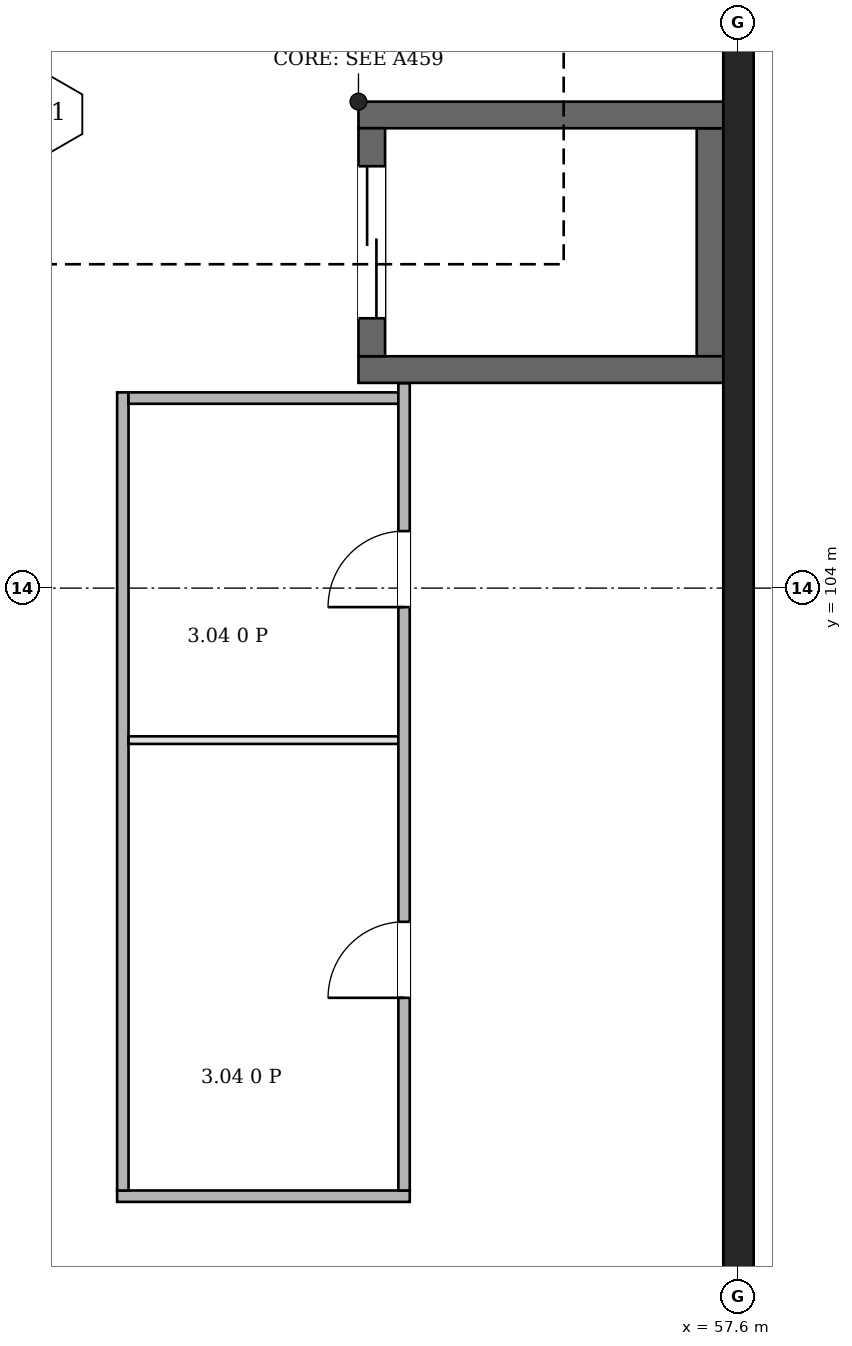
"""IFC4 building model, lengths in metres.
Left out: names, types, materials, properties, quantities, classifications, styles, units other than length and angle.
Written with IfcOpenShell. Run it as: python <this file> out.ifc"""

import sys

from ifc_helpers import new_model, si_unit, direction, frame, frame_2d, origin, place, context, subcontext, project, spatial, rectangle, extrude, element, fill, save


model = new_model("IFC4")
c1 = context("Model", 3, precision=1e-05, world=origin(), true_north=direction((0.0, 1.0)))
c2 = subcontext(c1, "Body", "Model", "MODEL_VIEW")
j1 = project(units=[si_unit("LENGTHUNIT", "METRE"), si_unit("PLANEANGLEUNIT", "RADIAN")], contexts=[c1])
p1 = place(None, origin())
s1 = spatial("IfcSite", under=j1, at=p1, CompositionType="ELEMENT")
p2 = place(p1, origin())
s2 = spatial("IfcBuilding", under=s1, at=p2, CompositionType="ELEMENT")
p3 = place(p2, frame((0.0, 0.0, 21.7)))
s3 = spatial("IfcBuildingStorey", under=s2, at=p3, CompositionType="ELEMENT", Elevation=21.7)
p4 = place(p3, frame((57.6, 94.12, 0.0), z_axis=(0.0, 0.0, 1.0), x_axis=(0.0, 1.0, 0.0)))
e1 = element("IfcWall", 1, at=p4, inside=s3, PredefinedType="SHEAR", context=c2, shape_type="SweptSolid", body=[
    extrude(rectangle(XDim=46.88, YDim=0.4, at=frame_2d((23.44, 0.0))), origin(), (0.0, 0.0, 1.0), 5.0),
])
for number, where, z_axis, x_axis in (
    (2, (52.6, 106.875, 0.0), (0.0, 0.0, 1.0), (1.0, 0.0, 0.0)),
    (3, (52.6, 110.225, 0.0), (0.0, 0.0, 1.0), (1.0, 0.0, 0.0)),
):
    element("IfcWall", number, at=place(p3, frame(where, z_axis=z_axis, x_axis=x_axis)), inside=s3, PredefinedType="SHEAR", context=c2, shape_type="SweptSolid", body=[
        extrude(rectangle(XDim=4.8, YDim=0.35, at=frame_2d((2.4, 0.0))), origin(), (0.0, 0.0, 1.0), 5.0),
    ])
p5 = place(p3, frame((52.775, 107.05, 0.0), z_axis=(0.0, 0.0, 1.0), x_axis=(0.0, 1.0, 0.0)))
e4 = element("IfcWall", 4, at=p5, inside=s3, PredefinedType="SHEAR", context=c2, shape_type="SweptSolid", body=[
    extrude(rectangle(XDim=3.0, YDim=0.35, at=frame_2d((1.5, 0.0))), origin(), (0.0, 0.0, 1.0), 5.0),
])
p6 = place(p5, frame((0.5, 0.0, 0.0)))
e5 = element("IfcOpeningElement", 5, at=p6, cuts=e4, PredefinedType="OPENING", context=c2, shape_type="SweptSolid", body=[
    extrude(rectangle(XDim=2.0, YDim=2.4, at=frame_2d((1.0, 1.2))), frame((0.0, 0.185, 0.0), z_axis=(0.0, -1.0, 0.0), x_axis=(1.0, 0.0, 0.0)), (0.0, 0.0, 1.0), 0.37),
])
p7 = place(p3, frame((57.225, 107.05, 0.0), z_axis=(0.0, 0.0, 1.0), x_axis=(0.0, 1.0, 0.0)))
e6 = element("IfcWall", 6, at=p7, inside=s3, PredefinedType="SHEAR", context=c2, shape_type="SweptSolid", body=[
    extrude(rectangle(XDim=3.0, YDim=0.35, at=frame_2d((1.5, 0.0))), origin(), (0.0, 0.0, 1.0), 5.0),
])
p8 = place(p3, frame((49.425, 96.0, 0.0), z_axis=(0.0, 0.0, 1.0), x_axis=(1.0, 0.0, 0.0)))
e7 = element("IfcWall", 7, at=p8, inside=s3, PredefinedType="PARTITIONING", context=c2, shape_type="SweptSolid", body=[
    extrude(rectangle(XDim=3.85, YDim=0.15, at=frame_2d((1.925, 0.0))), origin(), (0.0, 0.0, 1.0), 4.65),
])
p9 = place(p3, frame((49.5, 96.075, 0.0), z_axis=(0.0, 0.0, 1.0), x_axis=(0.0, 1.0, 0.0)))
e8 = element("IfcWall", 8, at=p9, inside=s3, PredefinedType="PARTITIONING", context=c2, shape_type="SweptSolid", body=[
    extrude(rectangle(XDim=10.5, YDim=0.15, at=frame_2d((5.25, 0.0))), origin(), (0.0, 0.0, 1.0), 4.65),
])
p10 = place(p3, frame((49.575, 102.0, 0.0), z_axis=(0.0, 0.0, 1.0), x_axis=(1.0, 0.0, 0.0)))
e9 = element("IfcWall", 9, at=p10, inside=s3, PredefinedType="PARTITIONING", context=c2, shape_type="SweptSolid", body=[
    extrude(rectangle(XDim=3.55, YDim=0.1, at=frame_2d((1.775, 0.0))), origin(), (0.0, 0.0, 1.0), 4.65),
])
p11 = place(p3, frame((49.575, 106.5, 0.0), z_axis=(0.0, 0.0, 1.0), x_axis=(1.0, 0.0, 0.0)))
e10 = element("IfcWall", 10, at=p11, inside=s3, PredefinedType="PARTITIONING", context=c2, shape_type="SweptSolid", body=[
    extrude(rectangle(XDim=3.55, YDim=0.15, at=frame_2d((1.775, 0.0))), origin(), (0.0, 0.0, 1.0), 4.65),
])
p12 = place(p3, frame((53.2, 96.075, 0.0), z_axis=(0.0, 0.0, 1.0), x_axis=(0.0, 1.0, 0.0)))
e11 = element("IfcWall", 11, at=p12, inside=s3, PredefinedType="PARTITIONING", context=c2, shape_type="SweptSolid", body=[
    extrude(rectangle(XDim=10.619, YDim=0.15, at=frame_2d((5.31, 0.0))), origin(), (0.0, 0.0, 1.0), 4.65),
])
p13 = place(p12, frame((2.535, 0.0, 0.0)))
e12 = element("IfcOpeningElement", 12, at=p13, cuts=e11, PredefinedType="OPENING", context=c2, shape_type="SweptSolid", body=[
    extrude(rectangle(XDim=1.0, YDim=2.1, at=frame_2d((0.5, 1.05))), frame((0.0, 0.085, 0.0), z_axis=(0.0, -1.0, 0.0), x_axis=(1.0, 0.0, 0.0)), (0.0, 0.0, 1.0), 0.17),
])
p14 = place(p12, frame((7.675, 0.0, 0.0)))
e13 = element("IfcOpeningElement", 13, at=p14, cuts=e11, PredefinedType="OPENING", context=c2, shape_type="SweptSolid", body=[
    extrude(rectangle(XDim=1.0, YDim=2.1, at=frame_2d((0.5, 1.05))), frame((0.0, 0.085, 0.0), z_axis=(0.0, -1.0, 0.0), x_axis=(1.0, 0.0, 0.0)), (0.0, 0.0, 1.0), 0.17),
])
p15 = place(p6, origin())
e14 = element("IfcDoor", 14, at=p15, inside=s3, OperationType="DOUBLE_DOOR_SLIDING", PredefinedType="DOOR", context=c2, shape_type="SweptSolid", body=[
    extrude(rectangle(XDim=2.0, YDim=2.4, at=frame_2d((1.0, 1.2))), frame((0.0, 0.025, 0.0), z_axis=(0.0, -1.0, 0.0), x_axis=(1.0, 0.0, 0.0)), (0.0, 0.0, 1.0), 0.05),
])
fill(e5, e14)
p16 = place(p13, origin())
e15 = element("IfcDoor", 15, at=p16, inside=s3, OperationType="SINGLE_SWING_LEFT", PredefinedType="DOOR", context=c2, shape_type="SweptSolid", body=[
    extrude(rectangle(XDim=1.0, YDim=2.1, at=frame_2d((0.5, 1.05))), frame((0.0, 0.025, 0.0), z_axis=(0.0, -1.0, 0.0), x_axis=(1.0, 0.0, 0.0)), (0.0, 0.0, 1.0), 0.05),
])
fill(e12, e15)
p17 = place(p14, origin())
e16 = element("IfcDoor", 16, at=p17, inside=s3, OperationType="SINGLE_SWING_RIGHT", PredefinedType="DOOR", context=c2, shape_type="SweptSolid", body=[
    extrude(rectangle(XDim=1.0, YDim=2.1, at=frame_2d((0.5, 1.05))), frame((0.0, 0.025, 0.0), z_axis=(0.0, -1.0, 0.0), x_axis=(1.0, 0.0, 0.0)), (0.0, 0.0, 1.0), 0.05),
])
fill(e13, e16)
save(model, sys.argv[1])
